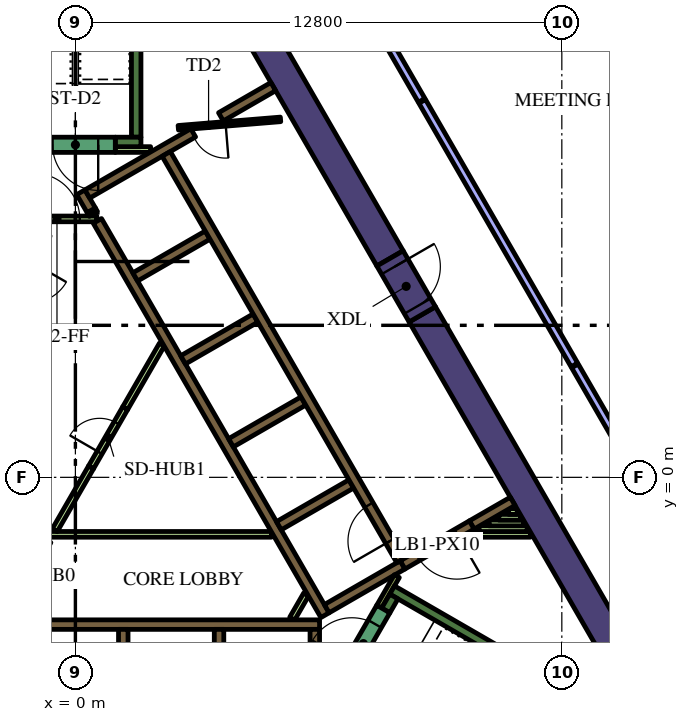
"""IFC4 building model, lengths in metres.
Left out: names, types, materials, properties, quantities, classifications, styles, units other than length and angle.
Written with IfcOpenShell. Run it as: python <this file> out.ifc"""

import sys

from ifc_helpers import new_model, si_unit, direction, frame, frame_2d, origin, place, context, subcontext, project, spatial, rectangle, extrude, element, fill, save


model = new_model("IFC4")
c1 = context("Model", 3, precision=1e-05, world=origin(), true_north=direction((0.0, 1.0)))
c2 = subcontext(c1, "Body", "Model", "MODEL_VIEW")
j1 = project(units=[si_unit("LENGTHUNIT", "METRE"), si_unit("PLANEANGLEUNIT", "RADIAN")], contexts=[c1])
p1 = place(None, origin())
s1 = spatial("IfcSite", under=j1, at=p1, CompositionType="ELEMENT")
p2 = place(p1, origin())
s2 = spatial("IfcBuilding", under=s1, at=p2, CompositionType="ELEMENT")
p3 = place(p2, frame((0.0, 0.0, 166.8)))
s3 = spatial("IfcBuildingStorey", under=s2, at=p3, CompositionType="ELEMENT", Elevation=166.8)
p4 = place(p3, frame((9.129, 4.289, 0.0), z_axis=(0.0, 0.0, 1.0), x_axis=(0.499995742806, -0.866027861663, 0.0)))
e1 = element("IfcWall", 1, at=p4, inside=s3, PredefinedType="SOLIDWALL", context=c2, shape_type="SweptSolid", body=[
    extrude(rectangle(XDim=12.527, YDim=0.8, at=frame_2d((6.264, 0.0))), origin(), (0.0, 0.0, 1.0), 4.2),
])
p5 = place(p3, frame((8.279, 5.761, 0.0), z_axis=(0.0, 0.0, 1.0), x_axis=(-0.500010359015, 0.866019422922, 0.0)))
e2 = element("IfcWall", 2, at=p5, inside=s3, PredefinedType="SOLIDWALL", context=c2, shape_type="SweptSolid", body=[
    extrude(rectangle(XDim=12.528, YDim=0.8, at=frame_2d((6.264, 0.0))), origin(), (0.0, 0.0, 1.0), 4.2),
])
p6 = place(p3, frame((8.334, -2.964, 0.0), z_axis=(0.0, 0.0, 1.0), x_axis=(0.866016039709, -0.500016218704, 0.0)))
e3 = element("IfcWall", 3, at=p6, inside=s3, PredefinedType="SOLIDWALL", context=c2, shape_type="SweptSolid", body=[
    extrude(rectangle(XDim=7.05, YDim=0.25, at=frame_2d((3.525, 0.0))), origin(), (0.0, 0.0, 1.0), 4.2),
])
p7 = place(p3, frame((8.168, -3.503, 0.0), z_axis=(0.0, 0.0, 1.0), x_axis=(0.49972245349, 0.866185586049, 0.0)))
e4 = element("IfcWall", 4, at=p7, inside=s3, PredefinedType="SOLIDWALL", context=c2, shape_type="SweptSolid", body=[
    extrude(rectangle(XDim=0.425, YDim=0.25, at=frame_2d((0.212, 0.0))), origin(), (0.0, 0.0, 1.0), 4.2),
])
p8 = place(p3, frame((1.6, 8.95, 0.0), z_axis=(0.0, 0.0, 1.0), x_axis=(0.0, 1.0, 0.0)))
e5 = element("IfcWall", 5, at=p8, inside=s3, PredefinedType="SOLIDWALL", context=c2, shape_type="SweptSolid", body=[
    extrude(rectangle(XDim=6.8, YDim=0.25, at=frame_2d((3.4, 0.0))), origin(), (0.0, 0.0, 1.0), 4.2),
])
p9 = place(p3, frame((1.05, 8.825, 0.0), z_axis=(0.0, 0.0, 1.0), x_axis=(1.0, 0.0, 0.0)))
e6 = element("IfcWall", 6, at=p9, inside=s3, PredefinedType="SOLIDWALL", context=c2, shape_type="SweptSolid", body=[
    extrude(rectangle(XDim=0.675, YDim=0.25, at=frame_2d((0.337, 0.0))), origin(), (0.0, 0.0, 1.0), 4.2),
])
p10 = place(p3, frame((-5.545, -3.875, 0.0), z_axis=(0.0, 0.0, 1.0), x_axis=(1.0, 0.0, 0.0)))
e7 = element("IfcWall", 7, at=p10, inside=s3, PredefinedType="SOLIDWALL", context=c2, shape_type="SweptSolid", body=[
    extrude(rectangle(XDim=11.97, YDim=0.25, at=frame_2d((5.985, 0.0))), origin(), (0.0, 0.0, 1.0), 4.2),
])
p11 = place(p3, frame((6.3, -7.24, 0.0), z_axis=(0.0, 0.0, 1.0), x_axis=(0.0, 1.0, 0.0)))
e8 = element("IfcWall", 8, at=p11, inside=s3, PredefinedType="SOLIDWALL", context=c2, shape_type="SweptSolid", body=[
    extrude(rectangle(XDim=3.24, YDim=0.25, at=frame_2d((1.62, 0.0))), origin(), (0.0, 0.0, 1.0), 4.2),
])
for number, where, z_axis, x_axis in (
    (9, (3.78, -4.0, 0.0), (0.0, 0.0, 1.0), (0.0, -1.0, 0.0)),
    (10, (1.26, -4.0, 0.0), (0.0, 0.0, 1.0), (0.0, -1.0, 0.0)),
):
    element("IfcWall", number, at=place(p3, frame(where, z_axis=z_axis, x_axis=x_axis)), inside=s3, PredefinedType="SOLIDWALL", context=c2, shape_type="SweptSolid", body=[
        extrude(rectangle(XDim=2.2, YDim=0.25, at=frame_2d((1.1, 0.0))), origin(), (0.0, 0.0, 1.0), 4.2),
    ])
p12 = place(p3, frame((11.507, -0.631, 0.0), z_axis=(0.0, 0.0, 1.0), x_axis=(-0.866025525965, -0.499999788377, 0.0)))
e11 = element("IfcWall", 11, at=p12, inside=s3, PredefinedType="SOLIDWALL", context=c2, shape_type="SweptSolid", body=[
    extrude(rectangle(XDim=1.245, YDim=0.25, at=frame_2d((0.622, 0.0))), origin(), (0.0, 0.0, 1.0), 4.2),
])
p13 = place(p3, frame((0.473, 6.93, 0.0), z_axis=(0.0, 0.0, 1.0), x_axis=(-0.49972245349, 0.866185586049, 0.0)))
e12 = element("IfcWall", 12, at=p13, inside=s3, PredefinedType="SOLIDWALL", context=c2, shape_type="SweptSolid", body=[
    extrude(rectangle(XDim=0.11, YDim=0.25, at=frame_2d((0.055, 0.0))), origin(), (0.0, 0.0, 1.0), 4.2),
])
p14 = place(p3, frame((6.568, -3.627, 0.0), z_axis=(0.0, 0.0, 1.0), x_axis=(-0.499999455981, 0.866025717874, 0.0)))
e13 = element("IfcWall", 13, at=p14, inside=s3, PredefinedType="SOLIDWALL", context=c2, shape_type="SweptSolid", body=[
    extrude(rectangle(XDim=11.978, YDim=0.25, at=frame_2d((5.989, 0.0))), origin(), (0.0, 0.0, 1.0), 4.2),
])
p15 = place(p3, frame((0.417, 7.027, 0.0), z_axis=(0.0, 0.0, 1.0), x_axis=(-0.500210807569, 0.865903659763, 0.0)))
e14 = element("IfcWall", 14, at=p15, inside=s3, PredefinedType="SOLIDWALL", context=c2, shape_type="SweptSolid", body=[
    extrude(rectangle(XDim=0.548, YDim=0.25, at=frame_2d((0.274, 0.0))), origin(), (0.0, 0.0, 1.0), 4.2),
])
p16 = place(p3, frame((3.1, 9.064, 0.0), z_axis=(0.0, 0.0, 1.0), x_axis=(-0.866030133475, -0.499991807846, 0.0)))
e15 = element("IfcWall", 15, at=p16, inside=s3, PredefinedType="SOLIDWALL", context=c2, shape_type="SweptSolid", body=[
    extrude(rectangle(XDim=3.217, YDim=0.25, at=frame_2d((1.608, 0.0))), origin(), (0.0, 0.0, 1.0), 4.2),
])
p17 = place(p3, frame((1.574, 5.274, 0.0), z_axis=(0.0, 0.0, 1.0), x_axis=(0.866028486751, 0.499994660107, 0.0)))
e16 = element("IfcWall", 16, at=p17, inside=s3, PredefinedType="SOLIDWALL", context=c2, shape_type="SweptSolid", body=[
    extrude(rectangle(XDim=2.2, YDim=0.25, at=frame_2d((1.1, 0.0))), origin(), (0.0, 0.0, 1.0), 4.2),
])
for number, where, z_axis, x_axis in (
    (17, (2.834, 3.091, 0.0), (0.0, 0.0, 1.0), (0.866, 0.5, 0.0)),
    (18, (4.094, 0.909, 0.0), (0.0, 0.0, 1.0), (0.866, 0.5, 0.0)),
    (19, (5.354, -1.274, 0.0), (0.0, 0.0, 1.0), (0.866, 0.5, 0.0)),
):
    element("IfcWall", number, at=place(p3, frame(where, z_axis=z_axis, x_axis=x_axis)), inside=s3, PredefinedType="SOLIDWALL", context=c2, shape_type="SweptSolid", body=[
        extrude(rectangle(XDim=2.2, YDim=0.25, at=frame_2d((1.1, 0.0))), origin(), (0.0, 0.0, 1.0), 4.2),
    ])
p18 = place(p3, frame((6.614, -3.456, 0.0), z_axis=(0.0, 0.0, 1.0), x_axis=(0.866025089694, 0.500000544019, 0.0)))
e20 = element("IfcWall", 20, at=p18, inside=s3, PredefinedType="SOLIDWALL", context=c2, shape_type="SweptSolid", body=[
    extrude(rectangle(XDim=2.305, YDim=0.25, at=frame_2d((1.153, 0.0))), origin(), (0.0, 0.0, 1.0), 4.2),
])
p19 = place(p3, frame((3.83, 9.486, 0.0), z_axis=(0.0, 0.0, 1.0), x_axis=(0.865986202621, 0.500067892261, 0.0)))
e21 = element("IfcWall", 21, at=p19, inside=s3, PredefinedType="SOLIDWALL", context=c2, shape_type="SweptSolid", body=[
    extrude(rectangle(XDim=1.591, YDim=0.25, at=frame_2d((0.795, 0.0))), origin(), (0.0, 0.0, 1.0), 4.2),
])
p20 = place(p3, frame((1.05, 8.625, 0.0), z_axis=(0.0, 0.0, 1.0), x_axis=(1.0, 0.0, 0.0)))
e22 = element("IfcWall", 22, at=p20, inside=s3, PredefinedType="PARTITIONING", context=c2, shape_type="SweptSolid", body=[
    extrude(rectangle(XDim=0.929, YDim=0.15, at=frame_2d((0.464, 0.0))), origin(), (0.0, 0.0, 1.0), 3.15),
])
p21 = place(p3, frame((10.362, -1.5, 0.0), z_axis=(0.0, 0.0, 1.0), x_axis=(1.0, 0.0, 0.0)))
e23 = element("IfcWall", 23, at=p21, inside=s3, PredefinedType="PARTITIONING", context=c2, shape_type="SweptSolid", body=[
    extrude(rectangle(XDim=1.61, YDim=0.15, at=frame_2d((0.805, 0.0))), origin(), (0.0, 0.0, 1.0), 3.15),
])
p22 = place(p3, frame((10.622, -1.35, 0.0), z_axis=(0.0, 0.0, 1.0), x_axis=(1.0, 0.0, 0.0)))
e24 = element("IfcWall", 24, at=p22, inside=s3, PredefinedType="PARTITIONING", context=c2, shape_type="SweptSolid", body=[
    extrude(rectangle(XDim=1.263, YDim=0.15, at=frame_2d((0.632, 0.0))), origin(), (0.0, 0.0, 1.0), 3.15),
])
p23 = place(p3, frame((10.882, -1.2, 0.0), z_axis=(0.0, 0.0, 1.0), x_axis=(1.0, 0.0, 0.0)))
e25 = element("IfcWall", 25, at=p23, inside=s3, PredefinedType="PARTITIONING", context=c2, shape_type="SweptSolid", body=[
    extrude(rectangle(XDim=0.917, YDim=0.15, at=frame_2d((0.459, 0.0))), origin(), (0.0, 0.0, 1.0), 3.15),
])
p24 = place(p3, frame((11.712, -1.05, 0.0), z_axis=(0.0, 0.0, 1.0), x_axis=(-1.0, 0.0, 0.0)))
e26 = element("IfcWall", 26, at=p24, inside=s3, PredefinedType="PARTITIONING", context=c2, shape_type="SweptSolid", body=[
    extrude(rectangle(XDim=0.571, YDim=0.15, at=frame_2d((0.285, 0.0))), origin(), (0.0, 0.0, 1.0), 3.15),
])
p25 = place(p3, frame((11.401, -0.9, 0.0), z_axis=(0.0, 0.0, 1.0), x_axis=(1.0, 0.0, 0.0)))
e27 = element("IfcWall", 27, at=p25, inside=s3, PredefinedType="PARTITIONING", context=c2, shape_type="SweptSolid", body=[
    extrude(rectangle(XDim=0.224, YDim=0.15, at=frame_2d((0.112, 0.0))), origin(), (0.0, 0.0, 1.0), 3.15),
])
p26 = place(p3, frame((8.459, -2.599, 0.0), z_axis=(0.0, 0.0, 1.0), x_axis=(-0.500041054325, -0.866001699761, 0.0)))
e28 = element("IfcWall", 28, at=p26, inside=s3, PredefinedType="PARTITIONING", context=c2, shape_type="SweptSolid", body=[
    extrude(rectangle(XDim=0.929, YDim=0.15, at=frame_2d((0.464, 0.0))), origin(), (0.0, 0.0, 1.0), 4.2),
])
p27 = place(p3, frame((5.705, -3.718, 0.0), z_axis=(0.0, 0.0, 1.0), x_axis=(0.499962090823, 0.866047289552, 0.0)))
e29 = element("IfcWall", 29, at=p27, inside=s3, PredefinedType="PARTITIONING", context=c2, shape_type="SweptSolid", body=[
    extrude(rectangle(XDim=0.735, YDim=0.15, at=frame_2d((0.367, 0.0))), origin(), (0.0, 0.0, 1.0), 3.15),
])
p28 = place(p3, frame((-4.2, -1.5, 0.0), z_axis=(0.0, 0.0, 1.0), x_axis=(1.0, 0.0, 0.0)))
e30 = element("IfcWall", 30, at=p28, inside=s3, PredefinedType="PARTITIONING", context=c2, shape_type="SweptSolid", body=[
    extrude(rectangle(XDim=9.359, YDim=0.15, at=frame_2d((4.68, 0.0))), origin(), (0.0, 0.0, 1.0), 3.15),
])
p29 = place(p3, frame((-0.544, -1.393, 0.0), z_axis=(0.0, 0.0, 1.0), x_axis=(0.499928740635, 0.866066541489, 0.0)))
e31 = element("IfcWall", 31, at=p29, inside=s3, PredefinedType="PARTITIONING", context=c2, shape_type="SweptSolid", body=[
    extrude(rectangle(XDim=1.912, YDim=0.15, at=frame_2d((0.956, 0.0))), origin(), (0.0, 0.0, 1.0), 3.15),
])
p30 = place(p3, frame((1.312, 1.822, 0.0), z_axis=(0.0, 0.0, 1.0), x_axis=(0.500003549559, 0.866023354436, 0.0)))
e32 = element("IfcWall", 32, at=p30, inside=s3, PredefinedType="PARTITIONING", context=c2, shape_type="SweptSolid", body=[
    extrude(rectangle(XDim=1.93, YDim=0.15, at=frame_2d((0.965, 0.0))), origin(), (0.0, 0.0, 1.0), 3.15),
])
p31 = place(p3, frame((8.565, -2.185, 0.0), z_axis=(0.0, 0.0, 1.0), x_axis=(-0.499997954832, 0.866026584559, 0.0)))
e33 = element("IfcWall", 33, at=p31, inside=s3, PredefinedType="SOLIDWALL", context=c2, shape_type="SweptSolid", body=[
    extrude(rectangle(XDim=12.35, YDim=0.25, at=frame_2d((6.175, 0.0))), origin(), (0.0, 0.0, 1.0), 4.2),
])
p32 = place(p31, frame((0.585, 0.0, 0.0)))
e34 = element("IfcOpeningElement", 34, at=p32, cuts=e33, PredefinedType="OPENING", context=c2, shape_type="SweptSolid", body=[
    extrude(rectangle(XDim=1.1, YDim=2.1, at=frame_2d((0.55, 1.05))), frame((0.0, 0.135, 0.0), z_axis=(0.0, -1.0, 0.0), x_axis=(1.0, 0.0, 0.0)), (0.0, 0.0, 1.0), 0.27),
])
p33 = place(p3, frame((7.053, -5.284, 0.0), z_axis=(0.0, 0.0, 1.0), x_axis=(0.500078061341, 0.865980330357, 0.0)))
e35 = element("IfcWall", 35, at=p33, inside=s3, PredefinedType="SOLIDWALL", context=c2, shape_type="SweptSolid", body=[
    extrude(rectangle(XDim=2.1, YDim=0.4, at=frame_2d((1.05, 0.0))), origin(), (0.0, 0.0, 1.0), 4.2),
])
p34 = place(p33, frame((0.45, 0.0, 0.0)))
e36 = element("IfcOpeningElement", 36, at=p34, cuts=e35, PredefinedType="OPENING", context=c2, shape_type="SweptSolid", body=[
    extrude(rectangle(XDim=1.2, YDim=2.1, at=frame_2d((0.6, 1.05))), frame((0.0, 0.21, 0.0), z_axis=(0.0, -1.0, 0.0), x_axis=(1.0, 0.0, 0.0)), (0.0, 0.0, 1.0), 0.42),
])
p35 = place(p3, frame((1.05, 8.75, 0.0), z_axis=(0.0, 0.0, 1.0), x_axis=(-1.0, 0.0, 0.0)))
e37 = element("IfcWall", 37, at=p35, inside=s3, PredefinedType="SOLIDWALL", context=c2, shape_type="SweptSolid", body=[
    extrude(rectangle(XDim=2.1, YDim=0.4, at=frame_2d((1.05, 0.0))), origin(), (0.0, 0.0, 1.0), 4.2),
])
p36 = place(p35, frame((0.45, 0.0, 0.0)))
e38 = element("IfcOpeningElement", 38, at=p36, cuts=e37, PredefinedType="OPENING", context=c2, shape_type="SweptSolid", body=[
    extrude(rectangle(XDim=1.2, YDim=2.1, at=frame_2d((0.6, 1.05))), frame((0.0, 0.21, 0.0), z_axis=(0.0, -1.0, 0.0), x_axis=(1.0, 0.0, 0.0)), (0.0, 0.0, 1.0), 0.42),
])
p37 = place(p3, frame((5.398, 9.419, 0.0), z_axis=(0.0, 0.0, 1.0), x_axis=(-0.996653416376, -0.081743303248, 0.0)))
e39 = element("IfcWall", 39, at=p37, inside=s3, PredefinedType="PARTITIONING", context=c2, shape_type="SweptSolid", body=[
    extrude(rectangle(XDim=2.7, YDim=0.12, at=frame_2d((1.35, 0.0))), origin(), (0.0, 0.0, 1.0), 3.15),
])
p38 = place(p37, frame((1.45, 0.0, 0.0)))
e40 = element("IfcOpeningElement", 40, at=p38, cuts=e39, PredefinedType="OPENING", context=c2, shape_type="SweptSolid", body=[
    extrude(rectangle(XDim=0.9, YDim=2.1, at=frame_2d((0.45, 1.05))), frame((0.0, 0.07, 0.0), z_axis=(0.0, -1.0, 0.0), x_axis=(1.0, 0.0, 0.0)), (0.0, 0.0, 1.0), 0.14),
])
p39 = place(p3, frame((-1.534, 6.8, 0.0), z_axis=(0.0, 0.0, 1.0), x_axis=(1.0, 0.0, 0.0)))
e41 = element("IfcWall", 41, at=p39, inside=s3, PredefinedType="PARTITIONING", context=c2, shape_type="SweptSolid", body=[
    extrude(rectangle(XDim=2.1, YDim=0.15, at=frame_2d((1.05, 0.0))), origin(), (0.0, 0.0, 1.0), 3.15),
])
p40 = place(p39, frame((0.45, 0.0, 0.0)))
e42 = element("IfcOpeningElement", 42, at=p40, cuts=e41, PredefinedType="OPENING", context=c2, shape_type="SweptSolid", body=[
    extrude(rectangle(XDim=1.2, YDim=2.1, at=frame_2d((0.6, 1.05))), frame((0.0, 0.085, 0.0), z_axis=(0.0, -1.0, 0.0), x_axis=(1.0, 0.0, 0.0)), (0.0, 0.0, 1.0), 0.17),
])
p41 = place(p3, frame((10.429, -1.253, 0.0), z_axis=(0.0, 0.0, 1.0), x_axis=(-0.866009402589, -0.500027713859, 0.0)))
e43 = element("IfcWall", 43, at=p41, inside=s3, PredefinedType="SOLIDWALL", context=c2, shape_type="SweptSolid", body=[
    extrude(rectangle(XDim=2.1, YDim=0.25, at=frame_2d((1.05, 0.0))), origin(), (0.0, 0.0, 1.0), 4.2),
])
p42 = place(p41, frame((0.45, 0.0, 0.0)))
e44 = element("IfcOpeningElement", 44, at=p42, cuts=e43, PredefinedType="OPENING", context=c2, shape_type="SweptSolid", body=[
    extrude(rectangle(XDim=1.2, YDim=2.1, at=frame_2d((0.6, 1.05))), frame((0.0, 0.135, 0.0), z_axis=(0.0, -1.0, 0.0), x_axis=(1.0, 0.0, 0.0)), (0.0, 0.0, 1.0), 0.27),
])
p43 = place(p3, frame((8.279, 5.761, 0.0), z_axis=(0.0, 0.0, 1.0), x_axis=(0.500062241894, -0.865989465428, 0.0)))
e45 = element("IfcWall", 45, at=p43, inside=s3, PredefinedType="SOLIDWALL", context=c2, shape_type="SweptSolid", body=[
    extrude(rectangle(XDim=1.7, YDim=0.8, at=frame_2d((0.85, 0.0))), origin(), (0.0, 0.0, 1.0), 4.2),
])
p44 = place(p43, frame((0.25, 0.0, 0.0)))
e46 = element("IfcOpeningElement", 46, at=p44, cuts=e45, PredefinedType="OPENING", context=c2, shape_type="SweptSolid", body=[
    extrude(rectangle(XDim=1.2, YDim=2.1, at=frame_2d((0.6, 1.05))), frame((0.0, 0.41, 0.0), z_axis=(0.0, -1.0, 0.0), x_axis=(1.0, 0.0, 0.0)), (0.0, 0.0, 1.0), 0.82),
])
p45 = place(p3, frame((0.412, 0.263, 0.0), z_axis=(0.0, 0.0, 1.0), x_axis=(0.500062916607, 0.865989075817, 0.0)))
e47 = element("IfcWall", 47, at=p45, inside=s3, PredefinedType="PARTITIONING", context=c2, shape_type="SweptSolid", body=[
    extrude(rectangle(XDim=1.8, YDim=0.15, at=frame_2d((0.9, 0.0))), origin(), (0.0, 0.0, 1.0), 3.15),
])
p46 = place(p45, frame((0.45, 0.0, 0.0)))
e48 = element("IfcOpeningElement", 48, at=p46, cuts=e47, PredefinedType="OPENING", context=c2, shape_type="SweptSolid", body=[
    extrude(rectangle(XDim=0.9, YDim=2.1, at=frame_2d((0.45, 1.05))), frame((0.0, 0.085, 0.0), z_axis=(0.0, -1.0, 0.0), x_axis=(1.0, 0.0, 0.0)), (0.0, 0.0, 1.0), 0.17),
])
p47 = place(p3, frame((13.13, 2.958, 0.0), z_axis=(0.0, 0.0, 1.0), x_axis=(-0.499995158272, 0.866028199139, 0.0)))
e49 = element("IfcWall", 49, at=p47, inside=s3, PredefinedType="PARTITIONING", context=c2, shape_type="SweptSolid", body=[
    extrude(rectangle(XDim=8.008, YDim=0.2, at=frame_2d((4.004, 0.0))), origin(), (0.0, 0.0, 1.0), 3.15),
])
p48 = place(p3, frame((9.111, 9.918, 0.0), z_axis=(0.0, 0.0, 1.0), x_axis=(-0.499954382462, 0.86605173948, 0.0)))
e50 = element("IfcWall", 50, at=p48, inside=s3, PredefinedType="PARTITIONING", context=c2, shape_type="SweptSolid", body=[
    extrude(rectangle(XDim=2.278, YDim=0.2, at=frame_2d((1.139, 0.0))), origin(), (0.0, 0.0, 1.0), 3.15),
])
p49 = place(p3, frame((14.297, 0.937, 0.0), z_axis=(0.0, 0.0, 1.0), x_axis=(-0.499970234539, 0.866042588199, 0.0)))
e51 = element("IfcWall", 51, at=p49, inside=s3, PredefinedType="PARTITIONING", context=c2, shape_type="SweptSolid", body=[
    extrude(rectangle(XDim=2.303, YDim=0.2, at=frame_2d((1.151, 0.0))), origin(), (0.0, 0.0, 1.0), 3.15),
])
p50 = place(p32, origin())
e52 = element("IfcDoor", 52, at=p50, inside=s3, OperationType="DOUBLE_DOOR_SLIDING", PredefinedType="DOOR", context=c2, shape_type="SweptSolid", body=[
    extrude(rectangle(XDim=1.1, YDim=2.1, at=frame_2d((0.55, 1.05))), frame((0.0, 0.025, 0.0), z_axis=(0.0, -1.0, 0.0), x_axis=(1.0, 0.0, 0.0)), (0.0, 0.0, 1.0), 0.05),
])
fill(e34, e52)
p51 = place(p34, origin())
e53 = element("IfcDoor", 53, at=p51, inside=s3, OperationType="SINGLE_SWING_LEFT", PredefinedType="DOOR", context=c2, shape_type="SweptSolid", body=[
    extrude(rectangle(XDim=1.2, YDim=2.1, at=frame_2d((0.6, 1.05))), frame((0.0, 0.025, 0.0), z_axis=(0.0, -1.0, 0.0), x_axis=(1.0, 0.0, 0.0)), (0.0, 0.0, 1.0), 0.05),
])
fill(e36, e53)
p52 = place(p36, origin())
e54 = element("IfcDoor", 54, at=p52, inside=s3, OperationType="SINGLE_SWING_LEFT", PredefinedType="DOOR", context=c2, shape_type="SweptSolid", body=[
    extrude(rectangle(XDim=1.2, YDim=2.1, at=frame_2d((0.6, 1.05))), frame((0.0, 0.025, 0.0), z_axis=(0.0, -1.0, 0.0), x_axis=(1.0, 0.0, 0.0)), (0.0, 0.0, 1.0), 0.05),
])
fill(e38, e54)
p53 = place(p38, origin())
e55 = element("IfcDoor", 55, at=p53, inside=s3, OperationType="SINGLE_SWING_LEFT", PredefinedType="DOOR", context=c2, shape_type="SweptSolid", body=[
    extrude(rectangle(XDim=0.9, YDim=2.1, at=frame_2d((0.45, 1.05))), frame((0.0, 0.025, 0.0), z_axis=(0.0, -1.0, 0.0), x_axis=(1.0, 0.0, 0.0)), (0.0, 0.0, 1.0), 0.05),
])
fill(e40, e55)
p54 = place(p40, origin())
e56 = element("IfcDoor", 56, at=p54, inside=s3, OperationType="SINGLE_SWING_LEFT", PredefinedType="DOOR", context=c2, shape_type="SweptSolid", body=[
    extrude(rectangle(XDim=1.2, YDim=2.1, at=frame_2d((0.6, 1.05))), frame((0.0, 0.025, 0.0), z_axis=(0.0, -1.0, 0.0), x_axis=(1.0, 0.0, 0.0)), (0.0, 0.0, 1.0), 0.05),
])
fill(e42, e56)
p55 = place(p42, origin())
e57 = element("IfcDoor", 57, at=p55, inside=s3, OperationType="SINGLE_SWING_LEFT", PredefinedType="DOOR", context=c2, shape_type="SweptSolid", body=[
    extrude(rectangle(XDim=1.2, YDim=2.1, at=frame_2d((0.6, 1.05))), frame((0.0, 0.025, 0.0), z_axis=(0.0, -1.0, 0.0), x_axis=(1.0, 0.0, 0.0)), (0.0, 0.0, 1.0), 0.05),
])
fill(e44, e57)
p56 = place(p44, origin())
e58 = element("IfcDoor", 58, at=p56, inside=s3, OperationType="SINGLE_SWING_LEFT", PredefinedType="DOOR", context=c2, shape_type="SweptSolid", body=[
    extrude(rectangle(XDim=1.2, YDim=2.1, at=frame_2d((0.6, 1.05))), frame((0.0, 0.025, 0.0), z_axis=(0.0, -1.0, 0.0), x_axis=(1.0, 0.0, 0.0)), (0.0, 0.0, 1.0), 0.05),
])
fill(e46, e58)
p57 = place(p46, origin())
e59 = element("IfcDoor", 59, at=p57, inside=s3, OperationType="SINGLE_SWING_LEFT", PredefinedType="DOOR", context=c2, shape_type="SweptSolid", body=[
    extrude(rectangle(XDim=0.9, YDim=2.1, at=frame_2d((0.45, 1.05))), frame((0.0, 0.025, 0.0), z_axis=(0.0, -1.0, 0.0), x_axis=(1.0, 0.0, 0.0)), (0.0, 0.0, 1.0), 0.05),
])
fill(e48, e59)
save(model, sys.argv[1])
